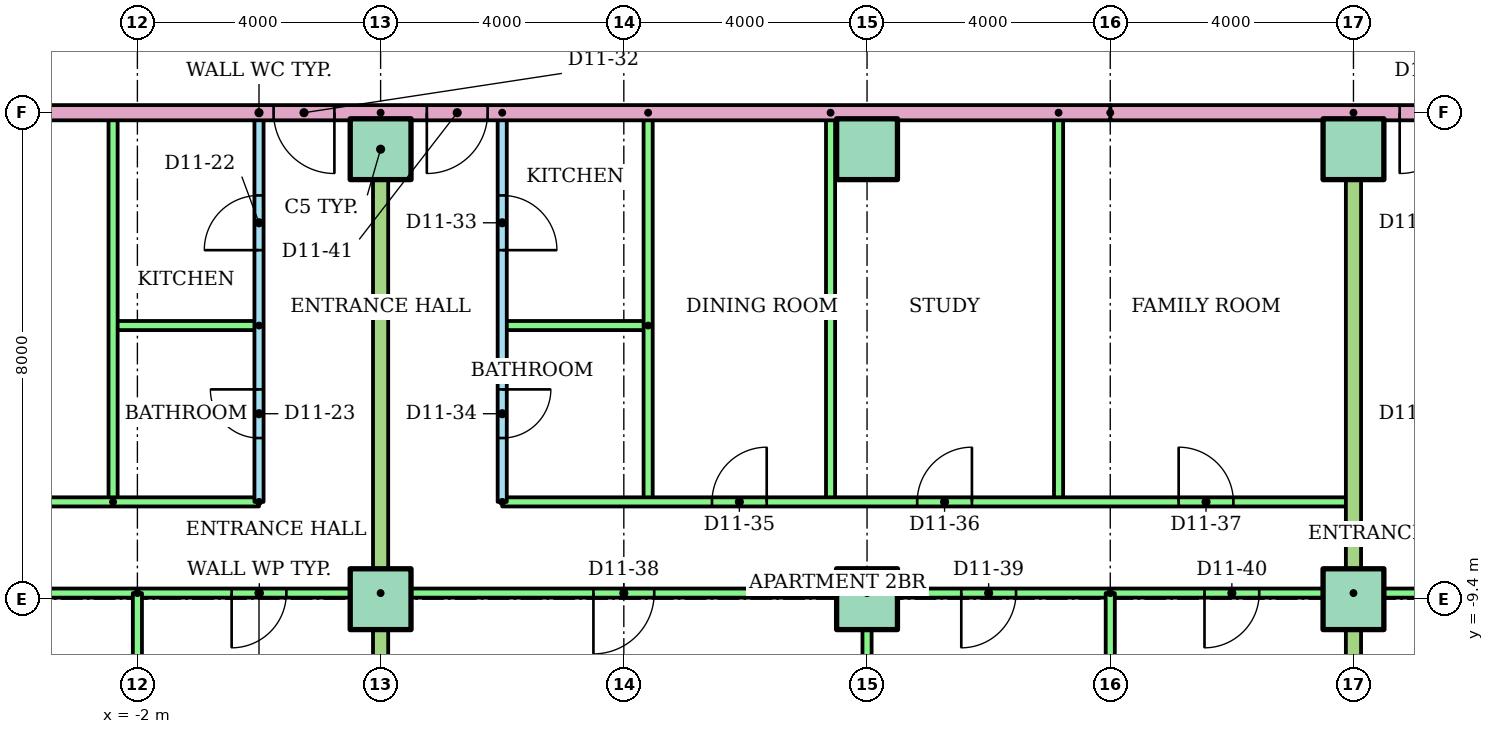
"""IFC4 building model, lengths in metres.
Left out: names, types, materials, properties, quantities, classifications, styles, units other than length and angle.
Written with IfcOpenShell. Run it as: python <this file> out.ifc"""

import sys

from ifc_helpers import new_model, si_unit, direction, frame, frame_2d, origin, origin_2d, place, context, subcontext, project, spatial, rectangle, extrude, element, fill, save


model = new_model("IFC4")
c1 = context("Model", 3, precision=1e-05, world=origin(), true_north=direction((0.0, 1.0)))
c2 = subcontext(c1, "Body", "Model", "MODEL_VIEW")
j1 = project(units=[si_unit("LENGTHUNIT", "METRE"), si_unit("PLANEANGLEUNIT", "RADIAN")], contexts=[c1])
p1 = place(None, origin())
s1 = spatial("IfcSite", under=j1, at=p1, CompositionType="ELEMENT")
p2 = place(p1, origin())
s2 = spatial("IfcBuilding", under=s1, at=p2, CompositionType="ELEMENT")
p3 = place(p2, frame((0.0, 0.0, 44.8)))
s3 = spatial("IfcBuildingStorey", under=s2, at=p3, CompositionType="ELEMENT", Elevation=44.8)
for number, where in (
    (1, (2.0, -9.4, 0.0)),
    (2, (10.0, -9.4, 0.0)),
    (3, (18.0, -9.4, 0.0)),
    (4, (2.0, -2.0, 0.0)),
    (5, (10.0, -2.0, 0.0)),
    (6, (18.0, -2.0, 0.0)),
):
    element("IfcColumn", number, at=place(p3, frame(where)), inside=s3, PredefinedType="COLUMN", context=c2, shape_type="SweptSolid", body=[
        extrude(rectangle(XDim=1.0, YDim=1.0, at=origin_2d()), origin(), (0.0, 0.0, 1.0), 3.2),
    ])
p4 = place(p3, frame((0.0, -7.8, 0.0), z_axis=(0.0, 0.0, 1.0), x_axis=(0.0, 1.0, 0.0)))
e7 = element("IfcWall", 7, at=p4, inside=s3, PredefinedType="PARTITIONING", context=c2, shape_type="SweptSolid", body=[
    extrude(rectangle(XDim=6.4, YDim=0.15, at=frame_2d((3.2, 0.0))), origin(), (0.0, 0.0, 1.0), 2.4),
])
p5 = place(p4, frame((4.14, 0.0, 0.0)))
e8 = element("IfcOpeningElement", 8, at=p5, cuts=e7, PredefinedType="OPENING", context=c2, shape_type="SweptSolid", body=[
    extrude(rectangle(XDim=0.9, YDim=2.1, at=frame_2d((0.45, 1.05))), frame((0.0, 0.085, 0.0), z_axis=(0.0, -1.0, 0.0), x_axis=(1.0, 0.0, 0.0)), (0.0, 0.0, 1.0), 0.17),
])
p6 = place(p4, frame((1.05, 0.0, 0.0)))
e9 = element("IfcOpeningElement", 9, at=p6, cuts=e7, PredefinedType="OPENING", context=c2, shape_type="SweptSolid", body=[
    extrude(rectangle(XDim=0.8, YDim=2.1, at=frame_2d((0.4, 1.05))), frame((0.0, 0.085, 0.0), z_axis=(0.0, -1.0, 0.0), x_axis=(1.0, 0.0, 0.0)), (0.0, 0.0, 1.0), 0.17),
])
p7 = place(p3, frame((0.0, -4.9, 0.0), z_axis=(0.0, 0.0, 1.0), x_axis=(-1.0, 0.0, 0.0)))
e10 = element("IfcWall", 10, at=p7, inside=s3, PredefinedType="PARTITIONING", context=c2, shape_type="SweptSolid", body=[
    extrude(rectangle(XDim=2.4, YDim=0.15, at=frame_2d((1.2, 0.0))), origin(), (0.0, 0.0, 1.0), 2.4),
])
p8 = place(p3, frame((-2.4, -7.8, 0.0), z_axis=(0.0, 0.0, 1.0), x_axis=(0.0, 1.0, 0.0)))
e11 = element("IfcWall", 11, at=p8, inside=s3, PredefinedType="PARTITIONING", context=c2, shape_type="SweptSolid", body=[
    extrude(rectangle(XDim=6.4, YDim=0.15, at=frame_2d((3.2, 0.0))), origin(), (0.0, 0.0, 1.0), 2.4),
])
p9 = place(p3, frame((-22.0, -7.8, 0.0)))
e12 = element("IfcWall", 12, at=p9, inside=s3, PredefinedType="PARTITIONING", context=c2, shape_type="SweptSolid", body=[
    extrude(rectangle(XDim=22.0, YDim=0.15, at=frame_2d((11.0, 0.0))), origin(), (0.0, 0.0, 1.0), 2.4),
])
p10 = place(p9, frame((14.34, 0.0, 0.0)))
e13 = element("IfcOpeningElement", 13, at=p10, cuts=e12, PredefinedType="OPENING", context=c2, shape_type="SweptSolid", body=[
    extrude(rectangle(XDim=0.9, YDim=2.1, at=frame_2d((0.45, 1.05))), frame((0.0, 0.085, 0.0), z_axis=(0.0, -1.0, 0.0), x_axis=(1.0, 0.0, 0.0)), (0.0, 0.0, 1.0), 0.17),
])
p11 = place(p9, frame((8.76, 0.0, 0.0)))
e14 = element("IfcOpeningElement", 14, at=p11, cuts=e12, PredefinedType="OPENING", context=c2, shape_type="SweptSolid", body=[
    extrude(rectangle(XDim=0.9, YDim=2.1, at=frame_2d((0.45, 1.05))), frame((0.0, 0.085, 0.0), z_axis=(0.0, -1.0, 0.0), x_axis=(1.0, 0.0, 0.0)), (0.0, 0.0, 1.0), 0.17),
])
p12 = place(p9, frame((1.975, 0.0, 0.0)))
e15 = element("IfcOpeningElement", 15, at=p12, cuts=e12, PredefinedType="OPENING", context=c2, shape_type="SweptSolid", body=[
    extrude(rectangle(XDim=0.9, YDim=2.1, at=frame_2d((0.45, 1.05))), frame((0.0, 0.085, 0.0), z_axis=(0.0, -1.0, 0.0), x_axis=(1.0, 0.0, 0.0)), (0.0, 0.0, 1.0), 0.17),
])
p13 = place(p3, frame((2.0, -9.3, 0.0), z_axis=(0.0, 0.0, 1.0), x_axis=(-1.0, 0.0, 0.0)))
e16 = element("IfcWall", 16, at=p13, inside=s3, PredefinedType="PARTITIONING", context=c2, shape_type="SweptSolid", body=[
    extrude(rectangle(XDim=24.0, YDim=0.15, at=frame_2d((12.0, 0.0))), origin(), (0.0, 0.0, 1.0), 2.4),
])
p14 = place(p13, frame((19.5, 0.0, 0.0)))
e17 = element("IfcOpeningElement", 17, at=p14, cuts=e16, PredefinedType="OPENING", context=c2, shape_type="SweptSolid", body=[
    extrude(rectangle(XDim=1.0, YDim=2.1, at=frame_2d((0.5, 1.05))), frame((0.0, 0.085, 0.0), z_axis=(0.0, -1.0, 0.0), x_axis=(1.0, 0.0, 0.0)), (0.0, 0.0, 1.0), 0.17),
])
p15 = place(p13, frame((13.55, 0.0, 0.0)))
e18 = element("IfcOpeningElement", 18, at=p15, cuts=e16, PredefinedType="OPENING", context=c2, shape_type="SweptSolid", body=[
    extrude(rectangle(XDim=0.9, YDim=2.1, at=frame_2d((0.45, 1.05))), frame((0.0, 0.085, 0.0), z_axis=(0.0, -1.0, 0.0), x_axis=(1.0, 0.0, 0.0)), (0.0, 0.0, 1.0), 0.17),
])
p16 = place(p13, frame((9.55, 0.0, 0.0)))
e19 = element("IfcOpeningElement", 19, at=p16, cuts=e16, PredefinedType="OPENING", context=c2, shape_type="SweptSolid", body=[
    extrude(rectangle(XDim=0.9, YDim=2.1, at=frame_2d((0.45, 1.05))), frame((0.0, 0.085, 0.0), z_axis=(0.0, -1.0, 0.0), x_axis=(1.0, 0.0, 0.0)), (0.0, 0.0, 1.0), 0.17),
])
p17 = place(p13, frame((5.55, 0.0, 0.0)))
e20 = element("IfcOpeningElement", 20, at=p17, cuts=e16, PredefinedType="OPENING", context=c2, shape_type="SweptSolid", body=[
    extrude(rectangle(XDim=0.9, YDim=2.1, at=frame_2d((0.45, 1.05))), frame((0.0, 0.085, 0.0), z_axis=(0.0, -1.0, 0.0), x_axis=(1.0, 0.0, 0.0)), (0.0, 0.0, 1.0), 0.17),
])
p18 = place(p13, frame((1.55, 0.0, 0.0)))
e21 = element("IfcOpeningElement", 21, at=p18, cuts=e16, PredefinedType="OPENING", context=c2, shape_type="SweptSolid", body=[
    extrude(rectangle(XDim=0.9, YDim=2.1, at=frame_2d((0.45, 1.05))), frame((0.0, 0.085, 0.0), z_axis=(0.0, -1.0, 0.0), x_axis=(1.0, 0.0, 0.0)), (0.0, 0.0, 1.0), 0.17),
])
p19 = place(p3, frame((-2.0, -9.3, 0.0), z_axis=(0.0, 0.0, 1.0), x_axis=(0.0, -1.0, 0.0)))
e22 = element("IfcWall", 22, at=p19, inside=s3, PredefinedType="PARTITIONING", context=c2, shape_type="SweptSolid", body=[
    extrude(rectangle(XDim=6.821, YDim=0.15, at=frame_2d((3.411, 0.0))), origin(), (0.0, 0.0, 1.0), 2.4),
])
p20 = place(p3, frame((4.0, -1.4, 0.0), z_axis=(0.0, 0.0, 1.0), x_axis=(0.0, -1.0, 0.0)))
e23 = element("IfcWall", 23, at=p20, inside=s3, PredefinedType="PARTITIONING", context=c2, shape_type="SweptSolid", body=[
    extrude(rectangle(XDim=6.4, YDim=0.15, at=frame_2d((3.2, 0.0))), origin(), (0.0, 0.0, 1.0), 2.4),
])
p21 = place(p20, frame((1.36, 0.0, 0.0)))
e24 = element("IfcOpeningElement", 24, at=p21, cuts=e23, PredefinedType="OPENING", context=c2, shape_type="SweptSolid", body=[
    extrude(rectangle(XDim=0.9, YDim=2.1, at=frame_2d((0.45, 1.05))), frame((0.0, 0.085, 0.0), z_axis=(0.0, -1.0, 0.0), x_axis=(1.0, 0.0, 0.0)), (0.0, 0.0, 1.0), 0.17),
])
p22 = place(p20, frame((4.55, 0.0, 0.0)))
e25 = element("IfcOpeningElement", 25, at=p22, cuts=e23, PredefinedType="OPENING", context=c2, shape_type="SweptSolid", body=[
    extrude(rectangle(XDim=0.8, YDim=2.1, at=frame_2d((0.4, 1.05))), frame((0.0, 0.085, 0.0), z_axis=(0.0, -1.0, 0.0), x_axis=(1.0, 0.0, 0.0)), (0.0, 0.0, 1.0), 0.17),
])
p23 = place(p3, frame((6.4, -4.9, 0.0), z_axis=(0.0, 0.0, 1.0), x_axis=(-1.0, 0.0, 0.0)))
e26 = element("IfcWall", 26, at=p23, inside=s3, PredefinedType="PARTITIONING", context=c2, shape_type="SweptSolid", body=[
    extrude(rectangle(XDim=2.4, YDim=0.15, at=frame_2d((1.2, 0.0))), origin(), (0.0, 0.0, 1.0), 2.4),
])
for number, where, z_axis, x_axis in (
    (27, (6.4, -1.4, 0.0), (0.0, 0.0, 1.0), (0.0, -1.0, 0.0)),
    (28, (9.4, -1.4, 0.0), (0.0, 0.0, 1.0), (0.0, -1.0, 0.0)),
    (29, (13.15, -1.4, 0.0), (0.0, 0.0, 1.0), (0.0, -1.0, 0.0)),
):
    element("IfcWall", number, at=place(p3, frame(where, z_axis=z_axis, x_axis=x_axis)), inside=s3, PredefinedType="PARTITIONING", context=c2, shape_type="SweptSolid", body=[
        extrude(rectangle(XDim=6.4, YDim=0.15, at=frame_2d((3.2, 0.0))), origin(), (0.0, 0.0, 1.0), 2.4),
    ])
p24 = place(p3, frame((4.0, -7.8, 0.0)))
e30 = element("IfcWall", 30, at=p24, inside=s3, PredefinedType="PARTITIONING", context=c2, shape_type="SweptSolid", body=[
    extrude(rectangle(XDim=14.0, YDim=0.15, at=frame_2d((7.0, 0.0))), origin(), (0.0, 0.0, 1.0), 2.4),
])
p25 = place(p24, frame((3.45, 0.0, 0.0)))
e31 = element("IfcOpeningElement", 31, at=p25, cuts=e30, PredefinedType="OPENING", context=c2, shape_type="SweptSolid", body=[
    extrude(rectangle(XDim=0.9, YDim=2.1, at=frame_2d((0.45, 1.05))), frame((0.0, 0.085, 0.0), z_axis=(0.0, -1.0, 0.0), x_axis=(1.0, 0.0, 0.0)), (0.0, 0.0, 1.0), 0.17),
])
p26 = place(p24, frame((6.825, 0.0, 0.0)))
e32 = element("IfcOpeningElement", 32, at=p26, cuts=e30, PredefinedType="OPENING", context=c2, shape_type="SweptSolid", body=[
    extrude(rectangle(XDim=0.9, YDim=2.1, at=frame_2d((0.45, 1.05))), frame((0.0, 0.085, 0.0), z_axis=(0.0, -1.0, 0.0), x_axis=(1.0, 0.0, 0.0)), (0.0, 0.0, 1.0), 0.17),
])
p27 = place(p24, frame((11.125, 0.0, 0.0)))
e33 = element("IfcOpeningElement", 33, at=p27, cuts=e30, PredefinedType="OPENING", context=c2, shape_type="SweptSolid", body=[
    extrude(rectangle(XDim=0.9, YDim=2.1, at=frame_2d((0.45, 1.05))), frame((0.0, 0.085, 0.0), z_axis=(0.0, -1.0, 0.0), x_axis=(1.0, 0.0, 0.0)), (0.0, 0.0, 1.0), 0.17),
])
p28 = place(p3, frame((18.0, -9.3, 0.0), z_axis=(0.0, 0.0, 1.0), x_axis=(-1.0, 0.0, 0.0)))
e34 = element("IfcWall", 34, at=p28, inside=s3, PredefinedType="PARTITIONING", context=c2, shape_type="SweptSolid", body=[
    extrude(rectangle(XDim=16.0, YDim=0.15, at=frame_2d((8.0, 0.0))), origin(), (0.0, 0.0, 1.0), 2.4),
])
p29 = place(p28, frame((11.5, 0.0, 0.0)))
e35 = element("IfcOpeningElement", 35, at=p29, cuts=e34, PredefinedType="OPENING", context=c2, shape_type="SweptSolid", body=[
    extrude(rectangle(XDim=1.0, YDim=2.1, at=frame_2d((0.5, 1.05))), frame((0.0, 0.085, 0.0), z_axis=(0.0, -1.0, 0.0), x_axis=(1.0, 0.0, 0.0)), (0.0, 0.0, 1.0), 0.17),
])
p30 = place(p28, frame((5.55, 0.0, 0.0)))
e36 = element("IfcOpeningElement", 36, at=p30, cuts=e34, PredefinedType="OPENING", context=c2, shape_type="SweptSolid", body=[
    extrude(rectangle(XDim=0.9, YDim=2.1, at=frame_2d((0.45, 1.05))), frame((0.0, 0.085, 0.0), z_axis=(0.0, -1.0, 0.0), x_axis=(1.0, 0.0, 0.0)), (0.0, 0.0, 1.0), 0.17),
])
p31 = place(p28, frame((1.55, 0.0, 0.0)))
e37 = element("IfcOpeningElement", 37, at=p31, cuts=e34, PredefinedType="OPENING", context=c2, shape_type="SweptSolid", body=[
    extrude(rectangle(XDim=0.9, YDim=2.1, at=frame_2d((0.45, 1.05))), frame((0.0, 0.085, 0.0), z_axis=(0.0, -1.0, 0.0), x_axis=(1.0, 0.0, 0.0)), (0.0, 0.0, 1.0), 0.17),
])
p32 = place(p3, frame((10.0, -9.3, 0.0), z_axis=(0.0, 0.0, 1.0), x_axis=(0.0, -1.0, 0.0)))
e38 = element("IfcWall", 38, at=p32, inside=s3, PredefinedType="PARTITIONING", context=c2, shape_type="SweptSolid", body=[
    extrude(rectangle(XDim=6.81, YDim=0.15, at=frame_2d((3.405, 0.0))), origin(), (0.0, 0.0, 1.0), 2.4),
])
p33 = place(p3, frame((14.0, -9.3, 0.0), z_axis=(0.0, 0.0, 1.0), x_axis=(0.0, -1.0, 0.0)))
e39 = element("IfcWall", 39, at=p33, inside=s3, PredefinedType="PARTITIONING", context=c2, shape_type="SweptSolid", body=[
    extrude(rectangle(XDim=6.821, YDim=0.15, at=frame_2d((3.411, 0.0))), origin(), (0.0, 0.0, 1.0), 2.4),
])
p34 = place(p3, frame((2.0, -1.4, 0.0), z_axis=(0.0, 0.0, 1.0), x_axis=(0.0, -1.0, 0.0)))
e40 = element("IfcWall", 40, at=p34, inside=s3, PredefinedType="PARTITIONING", context=c2, shape_type="SweptSolid", body=[
    extrude(rectangle(XDim=14.71, YDim=0.25, at=frame_2d((7.355, 0.0))), origin(), (0.0, 0.0, 1.0), 2.4),
])
p35 = place(p3, frame((36.52, -9.3, 0.0), z_axis=(0.0, 0.0, 1.0), x_axis=(-1.0, 0.0, 0.0)))
e41 = element("IfcWall", 41, at=p35, inside=s3, PredefinedType="PARTITIONING", context=c2, shape_type="SweptSolid", body=[
    extrude(rectangle(XDim=18.52, YDim=0.15, at=frame_2d((9.26, 0.0))), origin(), (0.0, 0.0, 1.0), 2.4),
])
p36 = place(p35, frame((16.07, 0.0, 0.0)))
e42 = element("IfcOpeningElement", 42, at=p36, cuts=e41, PredefinedType="OPENING", context=c2, shape_type="SweptSolid", body=[
    extrude(rectangle(XDim=0.9, YDim=2.1, at=frame_2d((0.45, 1.05))), frame((0.0, 0.085, 0.0), z_axis=(0.0, -1.0, 0.0), x_axis=(1.0, 0.0, 0.0)), (0.0, 0.0, 1.0), 0.17),
])
p37 = place(p35, frame((12.02, 0.0, 0.0)))
e43 = element("IfcOpeningElement", 43, at=p37, cuts=e41, PredefinedType="OPENING", context=c2, shape_type="SweptSolid", body=[
    extrude(rectangle(XDim=1.0, YDim=2.1, at=frame_2d((0.5, 1.05))), frame((0.0, 0.085, 0.0), z_axis=(0.0, -1.0, 0.0), x_axis=(1.0, 0.0, 0.0)), (0.0, 0.0, 1.0), 0.17),
])
p38 = place(p35, frame((7.17, 0.0, 0.0)))
e44 = element("IfcOpeningElement", 44, at=p38, cuts=e41, PredefinedType="OPENING", context=c2, shape_type="SweptSolid", body=[
    extrude(rectangle(XDim=0.9, YDim=2.1, at=frame_2d((0.45, 1.05))), frame((0.0, 0.085, 0.0), z_axis=(0.0, -1.0, 0.0), x_axis=(1.0, 0.0, 0.0)), (0.0, 0.0, 1.0), 0.17),
])
p39 = place(p35, frame((0.86, 0.0, 0.0)))
e45 = element("IfcOpeningElement", 45, at=p39, cuts=e41, PredefinedType="OPENING", context=c2, shape_type="SweptSolid", body=[
    extrude(rectangle(XDim=0.9, YDim=2.1, at=frame_2d((0.45, 1.05))), frame((0.0, 0.085, 0.0), z_axis=(0.0, -1.0, 0.0), x_axis=(1.0, 0.0, 0.0)), (0.0, 0.0, 1.0), 0.17),
])
p40 = place(p3, frame((18.0, -1.4, 0.0), z_axis=(0.0, 0.0, 1.0), x_axis=(0.0, -1.0, 0.0)))
e46 = element("IfcWall", 46, at=p40, inside=s3, PredefinedType="PARTITIONING", context=c2, shape_type="SweptSolid", body=[
    extrude(rectangle(XDim=14.71, YDim=0.25, at=frame_2d((7.355, 0.0))), origin(), (0.0, 0.0, 1.0), 2.4),
])
p41 = place(p3, frame((29.0, -1.4, 0.0), z_axis=(0.0, 0.0, 1.0), x_axis=(-1.0, 0.0, 0.0)))
e47 = element("IfcWall", 47, at=p41, inside=s3, PredefinedType="PARTITIONING", context=c2, shape_type="SweptSolid", body=[
    extrude(rectangle(XDim=15.0, YDim=0.25, at=frame_2d((7.5, 0.0))), origin(), (0.0, 0.0, 1.0), 2.4),
])
p42 = place(p41, frame((9.24, 0.0, 0.0)))
e48 = element("IfcOpeningElement", 48, at=p42, cuts=e47, PredefinedType="OPENING", context=c2, shape_type="SweptSolid", body=[
    extrude(rectangle(XDim=1.0, YDim=2.1, at=frame_2d((0.5, 1.05))), frame((0.0, 0.135, 0.0), z_axis=(0.0, -1.0, 0.0), x_axis=(1.0, 0.0, 0.0)), (0.0, 0.0, 1.0), 0.27),
])
p43 = place(p3, frame((14.0, -1.4, 0.0), z_axis=(0.0, 0.0, 1.0), x_axis=(-1.0, 0.0, 0.0)))
e49 = element("IfcWall", 49, at=p43, inside=s3, PredefinedType="PARTITIONING", context=c2, shape_type="SweptSolid", body=[
    extrude(rectangle(XDim=28.0, YDim=0.25, at=frame_2d((14.0, 0.0))), origin(), (0.0, 0.0, 1.0), 2.4),
])
p44 = place(p43, frame((12.76, 0.0, 0.0)))
e50 = element("IfcOpeningElement", 50, at=p44, cuts=e49, PredefinedType="OPENING", context=c2, shape_type="SweptSolid", body=[
    extrude(rectangle(XDim=1.0, YDim=2.1, at=frame_2d((0.5, 1.05))), frame((0.0, 0.135, 0.0), z_axis=(0.0, -1.0, 0.0), x_axis=(1.0, 0.0, 0.0)), (0.0, 0.0, 1.0), 0.27),
])
p45 = place(p43, frame((10.24, 0.0, 0.0)))
e51 = element("IfcOpeningElement", 51, at=p45, cuts=e49, PredefinedType="OPENING", context=c2, shape_type="SweptSolid", body=[
    extrude(rectangle(XDim=1.0, YDim=2.1, at=frame_2d((0.5, 1.05))), frame((0.0, 0.135, 0.0), z_axis=(0.0, -1.0, 0.0), x_axis=(1.0, 0.0, 0.0)), (0.0, 0.0, 1.0), 0.27),
])
p46 = place(p5, origin())
e52 = element("IfcDoor", 52, at=p46, inside=s3, OperationType="SINGLE_SWING_LEFT", PredefinedType="DOOR", context=c2, shape_type="SweptSolid", body=[
    extrude(rectangle(XDim=0.9, YDim=2.1, at=frame_2d((0.45, 1.05))), frame((0.0, 0.025, 0.0), z_axis=(0.0, -1.0, 0.0), x_axis=(1.0, 0.0, 0.0)), (0.0, 0.0, 1.0), 0.05),
])
fill(e8, e52)
p47 = place(p6, origin())
e53 = element("IfcDoor", 53, at=p47, inside=s3, OperationType="SINGLE_SWING_RIGHT", PredefinedType="DOOR", context=c2, shape_type="SweptSolid", body=[
    extrude(rectangle(XDim=0.8, YDim=2.1, at=frame_2d((0.4, 1.05))), frame((0.0, 0.025, 0.0), z_axis=(0.0, -1.0, 0.0), x_axis=(1.0, 0.0, 0.0)), (0.0, 0.0, 1.0), 0.05),
])
fill(e9, e53)
p48 = place(p18, origin())
e54 = element("IfcDoor", 54, at=p48, inside=s3, OperationType="SINGLE_SWING_RIGHT", PredefinedType="DOOR", context=c2, shape_type="SweptSolid", body=[
    extrude(rectangle(XDim=0.9, YDim=2.1, at=frame_2d((0.45, 1.05))), frame((0.0, 0.025, 0.0), z_axis=(0.0, -1.0, 0.0), x_axis=(1.0, 0.0, 0.0)), (0.0, 0.0, 1.0), 0.05),
])
fill(e21, e54)
p49 = place(p44, origin())
e55 = element("IfcDoor", 55, at=p49, inside=s3, OperationType="SINGLE_SWING_LEFT", PredefinedType="DOOR", context=c2, shape_type="SweptSolid", body=[
    extrude(rectangle(XDim=1.0, YDim=2.1, at=frame_2d((0.5, 1.05))), frame((0.0, 0.025, 0.0), z_axis=(0.0, -1.0, 0.0), x_axis=(1.0, 0.0, 0.0)), (0.0, 0.0, 1.0), 0.05),
])
fill(e50, e55)
p50 = place(p21, origin())
e56 = element("IfcDoor", 56, at=p50, inside=s3, OperationType="SINGLE_SWING_RIGHT", PredefinedType="DOOR", context=c2, shape_type="SweptSolid", body=[
    extrude(rectangle(XDim=0.9, YDim=2.1, at=frame_2d((0.45, 1.05))), frame((0.0, 0.025, 0.0), z_axis=(0.0, -1.0, 0.0), x_axis=(1.0, 0.0, 0.0)), (0.0, 0.0, 1.0), 0.05),
])
fill(e24, e56)
p51 = place(p22, origin())
e57 = element("IfcDoor", 57, at=p51, inside=s3, OperationType="SINGLE_SWING_LEFT", PredefinedType="DOOR", context=c2, shape_type="SweptSolid", body=[
    extrude(rectangle(XDim=0.8, YDim=2.1, at=frame_2d((0.4, 1.05))), frame((0.0, 0.025, 0.0), z_axis=(0.0, -1.0, 0.0), x_axis=(1.0, 0.0, 0.0)), (0.0, 0.0, 1.0), 0.05),
])
fill(e25, e57)
p52 = place(p25, origin())
e58 = element("IfcDoor", 58, at=p52, inside=s3, OperationType="SINGLE_SWING_RIGHT", PredefinedType="DOOR", context=c2, shape_type="SweptSolid", body=[
    extrude(rectangle(XDim=0.9, YDim=2.1, at=frame_2d((0.45, 1.05))), frame((0.0, 0.025, 0.0), z_axis=(0.0, -1.0, 0.0), x_axis=(1.0, 0.0, 0.0)), (0.0, 0.0, 1.0), 0.05),
])
fill(e31, e58)
p53 = place(p26, origin())
e59 = element("IfcDoor", 59, at=p53, inside=s3, OperationType="SINGLE_SWING_RIGHT", PredefinedType="DOOR", context=c2, shape_type="SweptSolid", body=[
    extrude(rectangle(XDim=0.9, YDim=2.1, at=frame_2d((0.45, 1.05))), frame((0.0, 0.025, 0.0), z_axis=(0.0, -1.0, 0.0), x_axis=(1.0, 0.0, 0.0)), (0.0, 0.0, 1.0), 0.05),
])
fill(e32, e59)
p54 = place(p27, origin())
e60 = element("IfcDoor", 60, at=p54, inside=s3, OperationType="SINGLE_SWING_LEFT", PredefinedType="DOOR", context=c2, shape_type="SweptSolid", body=[
    extrude(rectangle(XDim=0.9, YDim=2.1, at=frame_2d((0.45, 1.05))), frame((0.0, 0.025, 0.0), z_axis=(0.0, -1.0, 0.0), x_axis=(1.0, 0.0, 0.0)), (0.0, 0.0, 1.0), 0.05),
])
fill(e33, e60)
p55 = place(p29, origin())
e61 = element("IfcDoor", 61, at=p55, inside=s3, OperationType="SINGLE_SWING_RIGHT", PredefinedType="DOOR", context=c2, shape_type="SweptSolid", body=[
    extrude(rectangle(XDim=1.0, YDim=2.1, at=frame_2d((0.5, 1.05))), frame((0.0, 0.025, 0.0), z_axis=(0.0, -1.0, 0.0), x_axis=(1.0, 0.0, 0.0)), (0.0, 0.0, 1.0), 0.05),
])
fill(e35, e61)
p56 = place(p30, origin())
e62 = element("IfcDoor", 62, at=p56, inside=s3, OperationType="SINGLE_SWING_RIGHT", PredefinedType="DOOR", context=c2, shape_type="SweptSolid", body=[
    extrude(rectangle(XDim=0.9, YDim=2.1, at=frame_2d((0.45, 1.05))), frame((0.0, 0.025, 0.0), z_axis=(0.0, -1.0, 0.0), x_axis=(1.0, 0.0, 0.0)), (0.0, 0.0, 1.0), 0.05),
])
fill(e36, e62)
p57 = place(p31, origin())
e63 = element("IfcDoor", 63, at=p57, inside=s3, OperationType="SINGLE_SWING_RIGHT", PredefinedType="DOOR", context=c2, shape_type="SweptSolid", body=[
    extrude(rectangle(XDim=0.9, YDim=2.1, at=frame_2d((0.45, 1.05))), frame((0.0, 0.025, 0.0), z_axis=(0.0, -1.0, 0.0), x_axis=(1.0, 0.0, 0.0)), (0.0, 0.0, 1.0), 0.05),
])
fill(e37, e63)
p58 = place(p45, origin())
e64 = element("IfcDoor", 64, at=p58, inside=s3, OperationType="SINGLE_SWING_RIGHT", PredefinedType="DOOR", context=c2, shape_type="SweptSolid", body=[
    extrude(rectangle(XDim=1.0, YDim=2.1, at=frame_2d((0.5, 1.05))), frame((0.0, 0.025, 0.0), z_axis=(0.0, -1.0, 0.0), x_axis=(1.0, 0.0, 0.0)), (0.0, 0.0, 1.0), 0.05),
])
fill(e51, e64)
p59 = place(p42, origin())
e65 = element("IfcDoor", 65, at=p59, inside=s3, OperationType="SINGLE_SWING_RIGHT", PredefinedType="DOOR", context=c2, shape_type="SweptSolid", body=[
    extrude(rectangle(XDim=1.0, YDim=2.1, at=frame_2d((0.5, 1.05))), frame((0.0, 0.025, 0.0), z_axis=(0.0, -1.0, 0.0), x_axis=(1.0, 0.0, 0.0)), (0.0, 0.0, 1.0), 0.05),
])
fill(e48, e65)
save(model, sys.argv[1])
